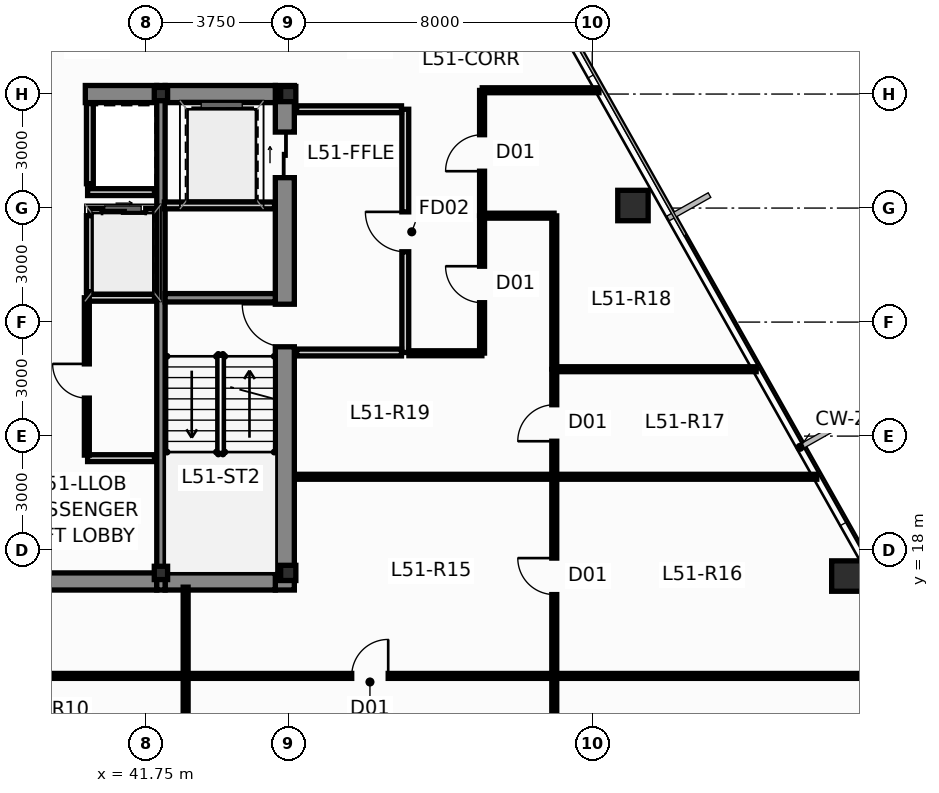
"""IFC4 building model, lengths in metres.
Left out: names, types, materials, properties, quantities, classifications, styles, units other than length and angle.
Written with IfcOpenShell. Run it as: python <this file> out.ifc"""

import sys

from ifc_helpers import new_model, si_unit, direction, frame, frame_2d, origin, origin_2d, place, context, subcontext, project, spatial, rectangle, hollow_rectangle, i_section, extrude, source, transform, mapped, element, fill, save


model = new_model("IFC4")
c1 = context("Model", 3, precision=1e-05, world=origin(), true_north=direction((0.0, 1.0)))
c2 = subcontext(c1, "Body", "Model", "MODEL_VIEW")
j1 = project(units=[si_unit("LENGTHUNIT", "METRE"), si_unit("PLANEANGLEUNIT", "RADIAN")], contexts=[c1])
p1 = place(None, origin())
s1 = spatial("IfcSite", under=j1, at=p1, CompositionType="ELEMENT")
p2 = place(p1, origin())
s2 = spatial("IfcBuilding", under=s1, at=p2, CompositionType="ELEMENT")
p3 = place(p2, frame((0.0, 0.0, 195.0)))
s3 = spatial("IfcBuildingStorey", under=s2, at=p3, CompositionType="ELEMENT", Elevation=195.0)
m1 = source(origin(), c2, "Body", "SweptSolid", [
    extrude(i_section(OverallWidth=0.4, OverallDepth=0.4, WebThickness=0.02, FlangeThickness=0.032, at=origin_2d()), origin(), (0.0, 0.0, 1.0), 3.65),
])
for number, where, z_axis, x_axis in (
    (1, (45.5, 17.4, 0.0), (0.0, 0.0, 1.0), (1.0, 0.0, 0.0)),
    (2, (45.5, 30.0, 0.0), (0.0, 0.0, 1.0), (1.0, 0.0, 0.0)),
):
    element("IfcColumn", number, at=place(p3, frame(where, z_axis=z_axis, x_axis=x_axis)), inside=s3, PredefinedType="COLUMN", context=c2, shape_type="MappedRepresentation", body=[
        mapped(m1, transform((0.0, 0.0, 0.0), scale=1.0)),
    ])
m2 = source(origin(), c2, "Body", "SweptSolid", [
    extrude(hollow_rectangle(XDim=0.35, YDim=0.35, WallThickness=0.016, at=origin_2d()), origin(), (0.0, 0.0, 1.0), 3.65),
])
for number, where, z_axis, x_axis in (
    (3, (42.15, 17.4, 0.0), (0.0, 0.0, 1.0), (1.0, 0.0, 0.0)),
    (4, (42.15, 30.0, 0.0), (0.0, 0.0, 1.0), (1.0, 0.0, 0.0)),
):
    element("IfcColumn", number, at=place(p3, frame(where, z_axis=z_axis, x_axis=x_axis)), inside=s3, PredefinedType="COLUMN", context=c2, shape_type="MappedRepresentation", body=[
        mapped(m2, transform((0.0, 0.0, 0.0), scale=1.0)),
    ])
p4 = place(p3, frame((45.41, 16.95, 0.0), z_axis=(0.0, 0.0, 1.0), x_axis=(0.0, 1.0, 0.0)))
e5 = element("IfcWall", 5, at=p4, inside=s3, PredefinedType="SHEAR", context=c2, shape_type="SweptSolid", body=[
    extrude(rectangle(XDim=13.275, YDim=0.5, at=frame_2d((6.638, 0.0))), origin(), (0.0, 0.0, 1.0), 3.65),
])
p5 = place(p4, frame((6.4, 0.0, 0.0)))
e6 = element("IfcOpeningElement", 6, at=p5, cuts=e5, PredefinedType="OPENING", context=c2, shape_type="SweptSolid", body=[
    extrude(rectangle(XDim=1.12, YDim=2.15, at=frame_2d((0.56, 1.075))), frame((0.0, 0.262, 0.0), z_axis=(0.0, -1.0, 0.0), x_axis=(1.0, 0.0, 0.0)), (0.0, 0.0, 1.0), 0.524),
])
p6 = place(p4, frame((10.85, 0.0, 0.0)))
e7 = element("IfcOpeningElement", 7, at=p6, cuts=e5, PredefinedType="OPENING", context=c2, shape_type="SweptSolid", body=[
    extrude(rectangle(XDim=1.2, YDim=2.2, at=frame_2d((0.6, 1.1))), frame((0.0, 0.262, 0.0), z_axis=(0.0, -1.0, 0.0), x_axis=(1.0, 0.0, 0.0)), (0.0, 0.0, 1.0), 0.524),
])
p7 = place(p3, frame((33.96, 17.175, 0.0), z_axis=(0.0, 0.0, 1.0), x_axis=(1.0, 0.0, 0.0)))
e8 = element("IfcWall", 8, at=p7, inside=s3, PredefinedType="SHEAR", context=c2, shape_type="SweptSolid", body=[
    extrude(rectangle(XDim=8.08, YDim=0.45, at=frame_2d((4.04, 0.0))), origin(), (0.0, 0.0, 1.0), 3.65),
])
p8 = place(p3, frame((42.26, 17.175, 0.0), z_axis=(0.0, 0.0, 1.0), x_axis=(1.0, 0.0, 0.0)))
e9 = element("IfcWall", 9, at=p8, inside=s3, PredefinedType="SHEAR", context=c2, shape_type="SweptSolid", body=[
    extrude(rectangle(XDim=2.9, YDim=0.45, at=frame_2d((1.45, 0.0))), origin(), (0.0, 0.0, 1.0), 3.65),
])
p9 = place(p3, frame((40.16, 30.0, 0.0), z_axis=(0.0, 0.0, 1.0), x_axis=(1.0, 0.0, 0.0)))
e10 = element("IfcWall", 10, at=p9, inside=s3, PredefinedType="SHEAR", context=c2, shape_type="SweptSolid", body=[
    extrude(rectangle(XDim=1.88, YDim=0.45, at=frame_2d((0.94, 0.0))), origin(), (0.0, 0.0, 1.0), 3.65),
])
p10 = place(p3, frame((42.26, 30.0, 0.0), z_axis=(0.0, 0.0, 1.0), x_axis=(1.0, 0.0, 0.0)))
e11 = element("IfcWall", 11, at=p10, inside=s3, PredefinedType="SHEAR", context=c2, shape_type="SweptSolid", body=[
    extrude(rectangle(XDim=2.9, YDim=0.45, at=frame_2d((1.45, 0.0))), origin(), (0.0, 0.0, 1.0), 3.65),
])
p11 = place(p3, frame((42.15, 16.95, 0.0), z_axis=(0.0, 0.0, 1.0), x_axis=(0.0, 1.0, 0.0)))
e12 = element("IfcWall", 12, at=p11, inside=s3, PredefinedType="SHEAR", context=c2, shape_type="SweptSolid", body=[
    extrude(rectangle(XDim=13.275, YDim=0.22, at=frame_2d((6.638, 0.0))), origin(), (0.0, 0.0, 1.0), 3.65),
])
p12 = place(p3, frame((42.26, 24.64, 0.0), z_axis=(0.0, 0.0, 1.0), x_axis=(1.0, 0.0, 0.0)))
e13 = element("IfcWall", 13, at=p12, inside=s3, PredefinedType="SHEAR", context=c2, shape_type="SweptSolid", body=[
    extrude(rectangle(XDim=2.9, YDim=0.22, at=frame_2d((1.45, 0.0))), origin(), (0.0, 0.0, 1.0), 3.65),
])
m3 = source(origin(), c2, "Body", "SweptSolid", [
    extrude(hollow_rectangle(XDim=0.8, YDim=0.8, WallThickness=0.045, at=origin_2d()), origin(), (0.0, 0.0, 1.0), 3.651),
])
p13 = place(p3, frame((60.2, 17.318, 0.0), z_axis=(-0.010431795422, -0.021532295679, 0.999713727968), x_axis=(0.899947055326, -0.435999194506, 0.0)))
e14 = element("IfcColumn", 14, at=p13, inside=s3, PredefinedType="COLUMN", context=c2, shape_type="MappedRepresentation", body=[
    mapped(m3, transform((0.0, 0.0, 0.0), scale=1.0)),
])
m4 = source(origin(), c2, "Body", "SweptSolid", [
    extrude(hollow_rectangle(XDim=0.8, YDim=0.8, WallThickness=0.045, at=origin_2d()), origin(), (0.0, 0.0, 1.0), 3.651),
])
p14 = place(p3, frame((54.571, 27.067, 0.0), z_axis=(-0.014913313399, -0.013776424037, 0.999793880369), x_axis=(0.678553674548, -0.734550822447, 0.0)))
e15 = element("IfcColumn", 15, at=p14, inside=s3, PredefinedType="COLUMN", context=c2, shape_type="MappedRepresentation", body=[
    mapped(m4, transform((0.0, 0.0, 0.0), scale=1.0)),
])
p15 = place(p3, frame((62.362, 14.626, 0.0), z_axis=(0.0, 0.0, 1.0), x_axis=(-0.506388960591, -0.86230517834, 0.0)))
e16 = element("IfcWall", 16, at=p15, inside=s3, PredefinedType="STANDARD", context=c2, shape_type="SweptSolid", body=[
    extrude(rectangle(XDim=8.234, YDim=0.28, at=frame_2d((4.117, 0.0))), origin(), (0.0, 0.0, 1.0), 3.4),
])
p16 = place(p15, frame((2.47, 0.0, 0.9)))
e17 = element("IfcOpeningElement", 17, at=p16, cuts=e16, PredefinedType="OPENING", context=c2, shape_type="SweptSolid", body=[
    extrude(rectangle(XDim=1.5, YDim=1.8, at=frame_2d((0.75, 0.9))), frame((0.0, 0.152, 0.0), z_axis=(0.0, -1.0, 0.0), x_axis=(1.0, 0.0, 0.0)), (0.0, 0.0, 1.0), 0.304),
])
p17 = place(p3, frame((40.28, 26.9, 0.0), z_axis=(0.0, 0.0, 1.0), x_axis=(1.0, 0.0, 0.0)))
e18 = element("IfcWall", 18, at=p17, inside=s3, PredefinedType="PARTITIONING", context=c2, shape_type="SweptSolid", body=[
    extrude(rectangle(XDim=1.7, YDim=0.18, at=frame_2d((0.85, 0.0))), origin(), (0.0, 0.0, 1.0), 3.4),
])
p18 = place(p17, frame((0.32, 0.0, 0.0)))
e19 = element("IfcOpeningElement", 19, at=p18, cuts=e18, PredefinedType="OPENING", context=c2, shape_type="SweptSolid", body=[
    extrude(rectangle(XDim=1.15, YDim=2.2, at=frame_2d((0.575, 1.1))), frame((0.0, 0.102, 0.0), z_axis=(0.0, -1.0, 0.0), x_axis=(1.0, 0.0, 0.0)), (0.0, 0.0, 1.0), 0.204),
])
p19 = place(p3, frame((40.28, 24.8, 0.0), z_axis=(0.0, 0.0, 1.0), x_axis=(0.0, 1.0, 0.0)))
e20 = element("IfcWall", 20, at=p19, inside=s3, PredefinedType="PARTITIONING", context=c2, shape_type="SweptSolid", body=[
    extrude(rectangle(XDim=2.0, YDim=0.18, at=frame_2d((1.0, 0.0))), origin(), (0.0, 0.0, 1.0), 3.4),
])
p20 = place(p3, frame((40.2, 24.64, 0.0), z_axis=(0.0, 0.0, 1.0), x_axis=(1.0, 0.0, 0.0)))
e21 = element("IfcWall", 21, at=p20, inside=s3, PredefinedType="PARTITIONING", context=c2, shape_type="SweptSolid", body=[
    extrude(rectangle(XDim=1.78, YDim=0.18, at=frame_2d((0.89, 0.0))), origin(), (0.0, 0.0, 1.0), 3.4),
])
p21 = place(p3, frame((40.22, 27.42, 0.0), z_axis=(0.0, 0.0, 1.0), x_axis=(1.0, 0.0, 0.0)))
e22 = element("IfcWall", 22, at=p21, inside=s3, PredefinedType="PARTITIONING", context=c2, shape_type="SweptSolid", body=[
    extrude(rectangle(XDim=1.76, YDim=0.18, at=frame_2d((0.88, 0.0))), origin(), (0.0, 0.0, 1.0), 3.4),
])
p22 = place(p3, frame((40.28, 27.64, 0.0), z_axis=(0.0, 0.0, 1.0), x_axis=(0.0, 1.0, 0.0)))
e23 = element("IfcWall", 23, at=p22, inside=s3, PredefinedType="PARTITIONING", context=c2, shape_type="SweptSolid", body=[
    extrude(rectangle(XDim=2.11, YDim=0.18, at=frame_2d((1.055, 0.0))), origin(), (0.0, 0.0, 1.0), 3.4),
])
p23 = place(p3, frame((48.58, 23.2, 0.0), z_axis=(0.0, 0.0, 1.0), x_axis=(0.0, 1.0, 0.0)))
e24 = element("IfcWall", 24, at=p23, inside=s3, PredefinedType="PARTITIONING", context=c2, shape_type="SweptSolid", body=[
    extrude(rectangle(XDim=6.4, YDim=0.18, at=frame_2d((3.2, 0.0))), origin(), (0.0, 0.0, 1.0), 3.078),
])
p24 = place(p23, frame((2.65, 0.0, 0.0)))
e25 = element("IfcOpeningElement", 25, at=p24, cuts=e24, PredefinedType="OPENING", context=c2, shape_type="SweptSolid", body=[
    extrude(rectangle(XDim=1.05, YDim=2.15, at=frame_2d((0.525, 1.075))), frame((0.0, 0.102, 0.0), z_axis=(0.0, -1.0, 0.0), x_axis=(1.0, 0.0, 0.0)), (0.0, 0.0, 1.0), 0.204),
])
p25 = place(p3, frame((45.72, 23.2, 0.0), z_axis=(0.0, 0.0, 1.0), x_axis=(1.0, 0.0, 0.0)))
e26 = element("IfcWall", 26, at=p25, inside=s3, PredefinedType="PARTITIONING", context=c2, shape_type="SweptSolid", body=[
    extrude(rectangle(XDim=2.76, YDim=0.18, at=frame_2d((1.38, 0.0))), origin(), (0.0, 0.0, 1.0), 3.4),
])
p26 = place(p3, frame((45.72, 29.6, 0.0), z_axis=(0.0, 0.0, 1.0), x_axis=(1.0, 0.0, 0.0)))
e27 = element("IfcWall", 27, at=p26, inside=s3, PredefinedType="PARTITIONING", context=c2, shape_type="SweptSolid", body=[
    extrude(rectangle(XDim=2.76, YDim=0.18, at=frame_2d((1.38, 0.0))), origin(), (0.0, 0.0, 1.0), 2.925),
])
p27 = place(p3, frame((42.24, 27.07, 0.0), z_axis=(0.0, 0.0, 1.0), x_axis=(1.0, 0.0, 0.0)))
e28 = element("IfcWall", 28, at=p27, inside=s3, PredefinedType="PARTITIONING", context=c2, shape_type="SweptSolid", body=[
    extrude(rectangle(XDim=2.9, YDim=0.18, at=frame_2d((1.45, 0.0))), origin(), (0.0, 0.0, 1.0), 3.4),
])
p28 = place(p3, frame((40.22, 20.42, 0.0), z_axis=(0.0, 0.0, 1.0), x_axis=(1.0, 0.0, 0.0)))
e29 = element("IfcWall", 29, at=p28, inside=s3, PredefinedType="PARTITIONING", context=c2, shape_type="SweptSolid", body=[
    extrude(rectangle(XDim=1.76, YDim=0.18, at=frame_2d((0.88, 0.0))), origin(), (0.0, 0.0, 1.0), 3.4),
])
p29 = place(p3, frame((40.2, 20.5, 0.0), z_axis=(0.0, 0.0, 1.0), x_axis=(0.0, 1.0, 0.0)))
e30 = element("IfcWall", 30, at=p29, inside=s3, PredefinedType="PARTITIONING", context=c2, shape_type="SweptSolid", body=[
    extrude(rectangle(XDim=4.14, YDim=0.13, at=frame_2d((2.07, 0.0))), origin(), (0.0, 0.0, 1.0), 3.4),
])
p30 = place(p29, frame((1.5, 0.0, 0.0)))
e31 = element("IfcOpeningElement", 31, at=p30, cuts=e30, PredefinedType="OPENING", context=c2, shape_type="SweptSolid", body=[
    extrude(rectangle(XDim=0.9, YDim=2.1, at=frame_2d((0.45, 1.05))), frame((0.0, 0.077, 0.0), z_axis=(0.0, -1.0, 0.0), x_axis=(1.0, 0.0, 0.0)), (0.0, 0.0, 1.0), 0.154),
])
p31 = place(p3, frame((52.505, 14.69, 0.0), z_axis=(0.0, 0.0, 1.0), x_axis=(1.0, 0.0, 0.0)))
e32 = element("IfcWall", 32, at=p31, inside=s3, PredefinedType="PARTITIONING", context=c2, shape_type="SweptSolid", body=[
    extrude(rectangle(XDim=9.856, YDim=0.13, at=frame_2d((4.928, 0.0))), origin(), (0.0, 0.0, 1.0), 3.4),
])
p32 = place(p3, frame((42.805, 14.69, 0.0), z_axis=(0.0, 0.0, 1.0), x_axis=(1.0, 0.0, 0.0)))
e33 = element("IfcWall", 33, at=p32, inside=s3, PredefinedType="PARTITIONING", context=c2, shape_type="SweptSolid", body=[
    extrude(rectangle(XDim=9.69, YDim=0.13, at=frame_2d((4.845, 0.0))), origin(), (0.0, 0.0, 1.0), 3.078),
])
p33 = place(p32, frame((4.365, 0.0, 0.0)))
e34 = element("IfcOpeningElement", 34, at=p33, cuts=e33, PredefinedType="OPENING", context=c2, shape_type="SweptSolid", body=[
    extrude(rectangle(XDim=0.96, YDim=2.15, at=frame_2d((0.48, 1.075))), frame((0.0, 0.077, 0.0), z_axis=(0.0, -1.0, 0.0), x_axis=(1.0, 0.0, 0.0)), (0.0, 0.0, 1.0), 0.154),
])
p34 = place(p3, frame((33.205, 14.69, 0.0), z_axis=(0.0, 0.0, 1.0), x_axis=(1.0, 0.0, 0.0)))
e35 = element("IfcWall", 35, at=p34, inside=s3, PredefinedType="PARTITIONING", context=c2, shape_type="SweptSolid", body=[
    extrude(rectangle(XDim=9.59, YDim=0.13, at=frame_2d((4.795, 0.0))), origin(), (0.0, 0.0, 1.0), 3.078),
])
p35 = place(p3, frame((52.505, 19.93, 0.0), z_axis=(0.0, 0.0, 1.0), x_axis=(1.0, 0.0, 0.0)))
e36 = element("IfcWall", 36, at=p35, inside=s3, PredefinedType="PARTITIONING", context=c2, shape_type="SweptSolid", body=[
    extrude(rectangle(XDim=6.903, YDim=0.13, at=frame_2d((3.451, 0.0))), origin(), (0.0, 0.0, 1.0), 3.4),
])
p36 = place(p3, frame((45.675, 19.93, 0.0), z_axis=(0.0, 0.0, 1.0), x_axis=(1.0, 0.0, 0.0)))
e37 = element("IfcWall", 37, at=p36, inside=s3, PredefinedType="PARTITIONING", context=c2, shape_type="SweptSolid", body=[
    extrude(rectangle(XDim=6.82, YDim=0.13, at=frame_2d((3.41, 0.0))), origin(), (0.0, 0.0, 1.0), 3.4),
])
p37 = place(p3, frame((52.505, 22.76, 0.0), z_axis=(0.0, 0.0, 1.0), x_axis=(1.0, 0.0, 0.0)))
e38 = element("IfcWall", 38, at=p37, inside=s3, PredefinedType="PARTITIONING", context=c2, shape_type="SweptSolid", body=[
    extrude(rectangle(XDim=5.308, YDim=0.13, at=frame_2d((2.654, 0.0))), origin(), (0.0, 0.0, 1.0), 3.4),
])
p38 = place(p3, frame((52.5, 14.695, 0.0), z_axis=(0.0, 0.0, 1.0), x_axis=(0.0, 1.0, 0.0)))
e39 = element("IfcWall", 39, at=p38, inside=s3, PredefinedType="PARTITIONING", context=c2, shape_type="SweptSolid", body=[
    extrude(rectangle(XDim=5.23, YDim=0.13, at=frame_2d((2.615, 0.0))), origin(), (0.0, 0.0, 1.0), 3.4),
])
p39 = place(p38, frame((2.135, 0.0, 0.0)))
e40 = element("IfcOpeningElement", 40, at=p39, cuts=e39, PredefinedType="OPENING", context=c2, shape_type="SweptSolid", body=[
    extrude(rectangle(XDim=0.96, YDim=2.15, at=frame_2d((0.48, 1.075))), frame((0.0, 0.077, 0.0), z_axis=(0.0, -1.0, 0.0), x_axis=(1.0, 0.0, 0.0)), (0.0, 0.0, 1.0), 0.154),
])
p40 = place(p3, frame((52.5, 22.765, 0.0), z_axis=(0.0, 0.0, 1.0), x_axis=(0.0, 1.0, 0.0)))
e41 = element("IfcWall", 41, at=p40, inside=s3, PredefinedType="PARTITIONING", context=c2, shape_type="SweptSolid", body=[
    extrude(rectangle(XDim=4.03, YDim=0.13, at=frame_2d((2.015, 0.0))), origin(), (0.0, 0.0, 1.0), 3.078),
])
p41 = place(p3, frame((42.8, 10.665, 0.0), z_axis=(0.0, 0.0, 1.0), x_axis=(0.0, 1.0, 0.0)))
e42 = element("IfcWall", 42, at=p41, inside=s3, PredefinedType="PARTITIONING", context=c2, shape_type="SweptSolid", body=[
    extrude(rectangle(XDim=4.02, YDim=0.13, at=frame_2d((2.01, 0.0))), origin(), (0.0, 0.0, 1.0), 3.4),
])
p42 = place(p3, frame((52.5, 10.665, 0.0), z_axis=(0.0, 0.0, 1.0), x_axis=(0.0, 1.0, 0.0)))
e43 = element("IfcWall", 43, at=p42, inside=s3, PredefinedType="PARTITIONING", context=c2, shape_type="SweptSolid", body=[
    extrude(rectangle(XDim=4.02, YDim=0.13, at=frame_2d((2.01, 0.0))), origin(), (0.0, 0.0, 1.0), 3.4),
])
p43 = place(p42, frame((1.53, 0.0, 0.0)))
e44 = element("IfcOpeningElement", 44, at=p43, cuts=e43, PredefinedType="OPENING", context=c2, shape_type="SweptSolid", body=[
    extrude(rectangle(XDim=0.96, YDim=2.15, at=frame_2d((0.48, 1.075))), frame((0.0, 0.077, 0.0), z_axis=(0.0, -1.0, 0.0), x_axis=(1.0, 0.0, 0.0)), (0.0, 0.0, 1.0), 0.154),
])
p44 = place(p3, frame((50.6, 23.185, 0.0), z_axis=(0.0, 0.0, 1.0), x_axis=(0.0, 1.0, 0.0)))
e45 = element("IfcWall", 45, at=p44, inside=s3, PredefinedType="PARTITIONING", context=c2, shape_type="SweptSolid", body=[
    extrude(rectangle(XDim=3.61, YDim=0.13, at=frame_2d((1.805, 0.0))), origin(), (0.0, 0.0, 1.0), 3.078),
])
p45 = place(p44, frame((1.325, 0.0, 0.0)))
e46 = element("IfcOpeningElement", 46, at=p45, cuts=e45, PredefinedType="OPENING", context=c2, shape_type="SweptSolid", body=[
    extrude(rectangle(XDim=0.96, YDim=2.15, at=frame_2d((0.48, 1.075))), frame((0.0, 0.077, 0.0), z_axis=(0.0, -1.0, 0.0), x_axis=(1.0, 0.0, 0.0)), (0.0, 0.0, 1.0), 0.154),
])
p46 = place(p3, frame((50.6, 26.805, 0.0), z_axis=(0.0, 0.0, 1.0), x_axis=(0.0, 1.0, 0.0)))
e47 = element("IfcWall", 47, at=p46, inside=s3, PredefinedType="PARTITIONING", context=c2, shape_type="SweptSolid", body=[
    extrude(rectangle(XDim=3.29, YDim=0.13, at=frame_2d((1.645, 0.0))), origin(), (0.0, 0.0, 1.0), 3.078),
])
p47 = place(p46, frame((1.165, 0.0, 0.0)))
e48 = element("IfcOpeningElement", 48, at=p47, cuts=e47, PredefinedType="OPENING", context=c2, shape_type="SweptSolid", body=[
    extrude(rectangle(XDim=0.96, YDim=2.15, at=frame_2d((0.48, 1.075))), frame((0.0, 0.077, 0.0), z_axis=(0.0, -1.0, 0.0), x_axis=(1.0, 0.0, 0.0)), (0.0, 0.0, 1.0), 0.154),
])
p48 = place(p3, frame((50.605, 30.1, 0.0), z_axis=(0.0, 0.0, 1.0), x_axis=(1.0, 0.0, 0.0)))
e49 = element("IfcWall", 49, at=p48, inside=s3, PredefinedType="PARTITIONING", context=c2, shape_type="SweptSolid", body=[
    extrude(rectangle(XDim=3.071, YDim=0.13, at=frame_2d((1.535, 0.0))), origin(), (0.0, 0.0, 1.0), 3.4),
])
p49 = place(p3, frame((52.5, 19.935, 0.0), z_axis=(0.0, 0.0, 1.0), x_axis=(0.0, 1.0, 0.0)))
e50 = element("IfcWall", 50, at=p49, inside=s3, PredefinedType="PARTITIONING", context=c2, shape_type="SweptSolid", body=[
    extrude(rectangle(XDim=2.82, YDim=0.13, at=frame_2d((1.41, 0.0))), origin(), (0.0, 0.0, 1.0), 3.078),
])
p50 = place(p49, frame((0.93, 0.0, 0.0)))
e51 = element("IfcOpeningElement", 51, at=p50, cuts=e50, PredefinedType="OPENING", context=c2, shape_type="SweptSolid", body=[
    extrude(rectangle(XDim=0.96, YDim=2.15, at=frame_2d((0.48, 1.075))), frame((0.0, 0.077, 0.0), z_axis=(0.0, -1.0, 0.0), x_axis=(1.0, 0.0, 0.0)), (0.0, 0.0, 1.0), 0.154),
])
p51 = place(p3, frame((42.8, 14.695, 0.0), z_axis=(0.0, 0.0, 1.0), x_axis=(0.0, 1.0, 0.0)))
e52 = element("IfcWall", 52, at=p51, inside=s3, PredefinedType="PARTITIONING", context=c2, shape_type="SweptSolid", body=[
    extrude(rectangle(XDim=2.33, YDim=0.13, at=frame_2d((1.165, 0.0))), origin(), (0.0, 0.0, 1.0), 3.4),
])
p52 = place(p3, frame((48.675, 23.18, 0.0), z_axis=(0.0, 0.0, 1.0), x_axis=(1.0, 0.0, 0.0)))
e53 = element("IfcWall", 53, at=p52, inside=s3, PredefinedType="PARTITIONING", context=c2, shape_type="SweptSolid", body=[
    extrude(rectangle(XDim=1.92, YDim=0.13, at=frame_2d((0.96, 0.0))), origin(), (0.0, 0.0, 1.0), 3.4),
])
p53 = place(p3, frame((52.495, 26.8, 0.0), z_axis=(0.0, 0.0, 1.0), x_axis=(-1.0, 0.0, 0.0)))
e54 = element("IfcWall", 54, at=p53, inside=s3, PredefinedType="PARTITIONING", context=c2, shape_type="SweptSolid", body=[
    extrude(rectangle(XDim=1.89, YDim=0.13, at=frame_2d((0.945, 0.0))), origin(), (0.0, 0.0, 1.0), 3.4),
])
p54 = place(p5, origin())
e55 = element("IfcDoor", 55, at=p54, inside=s3, OperationType="SINGLE_SWING_RIGHT", PredefinedType="DOOR", context=c2, shape_type="SweptSolid", body=[
    extrude(rectangle(XDim=1.12, YDim=2.15, at=frame_2d((0.56, 1.075))), frame((0.0, 0.025, 0.0), z_axis=(0.0, -1.0, 0.0), x_axis=(1.0, 0.0, 0.0)), (0.0, 0.0, 1.0), 0.05),
])
fill(e6, e55)
p55 = place(p6, origin())
e56 = element("IfcDoor", 56, at=p55, inside=s3, OperationType="SLIDING_TO_RIGHT", PredefinedType="DOOR", context=c2, shape_type="SweptSolid", body=[
    extrude(rectangle(XDim=1.2, YDim=2.2, at=frame_2d((0.6, 1.1))), frame((0.0, 0.025, 0.0), z_axis=(0.0, -1.0, 0.0), x_axis=(1.0, 0.0, 0.0)), (0.0, 0.0, 1.0), 0.05),
])
fill(e7, e56)
p56 = place(p18, origin())
e57 = element("IfcDoor", 57, at=p56, inside=s3, OperationType="SLIDING_TO_LEFT", PredefinedType="DOOR", context=c2, shape_type="SweptSolid", body=[
    extrude(rectangle(XDim=1.15, YDim=2.2, at=frame_2d((0.575, 1.1))), frame((0.0, 0.025, 0.0), z_axis=(0.0, -1.0, 0.0), x_axis=(1.0, 0.0, 0.0)), (0.0, 0.0, 1.0), 0.05),
])
fill(e19, e57)
p57 = place(p24, origin())
e58 = element("IfcDoor", 58, at=p57, inside=s3, OperationType="SINGLE_SWING_RIGHT", PredefinedType="DOOR", context=c2, shape_type="SweptSolid", body=[
    extrude(rectangle(XDim=1.05, YDim=2.15, at=frame_2d((0.525, 1.075))), frame((0.0, 0.025, 0.0), z_axis=(0.0, -1.0, 0.0), x_axis=(1.0, 0.0, 0.0)), (0.0, 0.0, 1.0), 0.05),
])
fill(e25, e58)
p58 = place(p30, origin())
e59 = element("IfcDoor", 59, at=p58, inside=s3, OperationType="SINGLE_SWING_RIGHT", PredefinedType="DOOR", context=c2, shape_type="SweptSolid", body=[
    extrude(rectangle(XDim=0.9, YDim=2.1, at=frame_2d((0.45, 1.05))), frame((0.0, 0.025, 0.0), z_axis=(0.0, -1.0, 0.0), x_axis=(1.0, 0.0, 0.0)), (0.0, 0.0, 1.0), 0.05),
])
fill(e31, e59)
p59 = place(p33, origin())
e60 = element("IfcDoor", 60, at=p59, inside=s3, OperationType="SINGLE_SWING_RIGHT", PredefinedType="DOOR", context=c2, shape_type="SweptSolid", body=[
    extrude(rectangle(XDim=0.96, YDim=2.15, at=frame_2d((0.48, 1.075))), frame((0.0, 0.025, 0.0), z_axis=(0.0, -1.0, 0.0), x_axis=(1.0, 0.0, 0.0)), (0.0, 0.0, 1.0), 0.05),
])
fill(e34, e60)
p60 = place(p39, origin())
e61 = element("IfcDoor", 61, at=p60, inside=s3, OperationType="SINGLE_SWING_RIGHT", PredefinedType="DOOR", context=c2, shape_type="SweptSolid", body=[
    extrude(rectangle(XDim=0.96, YDim=2.15, at=frame_2d((0.48, 1.075))), frame((0.0, 0.025, 0.0), z_axis=(0.0, -1.0, 0.0), x_axis=(1.0, 0.0, 0.0)), (0.0, 0.0, 1.0), 0.05),
])
fill(e40, e61)
p61 = place(p45, origin())
e62 = element("IfcDoor", 62, at=p61, inside=s3, OperationType="SINGLE_SWING_RIGHT", PredefinedType="DOOR", context=c2, shape_type="SweptSolid", body=[
    extrude(rectangle(XDim=0.96, YDim=2.15, at=frame_2d((0.48, 1.075))), frame((0.0, 0.025, 0.0), z_axis=(0.0, -1.0, 0.0), x_axis=(1.0, 0.0, 0.0)), (0.0, 0.0, 1.0), 0.05),
])
fill(e46, e62)
p62 = place(p47, origin())
e63 = element("IfcDoor", 63, at=p62, inside=s3, OperationType="SINGLE_SWING_LEFT", PredefinedType="DOOR", context=c2, shape_type="SweptSolid", body=[
    extrude(rectangle(XDim=0.96, YDim=2.15, at=frame_2d((0.48, 1.075))), frame((0.0, 0.025, 0.0), z_axis=(0.0, -1.0, 0.0), x_axis=(1.0, 0.0, 0.0)), (0.0, 0.0, 1.0), 0.05),
])
fill(e48, e63)
p63 = place(p50, origin())
e64 = element("IfcDoor", 64, at=p63, inside=s3, OperationType="SINGLE_SWING_LEFT", PredefinedType="DOOR", context=c2, shape_type="SweptSolid", body=[
    extrude(rectangle(XDim=0.96, YDim=2.15, at=frame_2d((0.48, 1.075))), frame((0.0, 0.025, 0.0), z_axis=(0.0, -1.0, 0.0), x_axis=(1.0, 0.0, 0.0)), (0.0, 0.0, 1.0), 0.05),
])
fill(e51, e64)
save(model, sys.argv[1])
